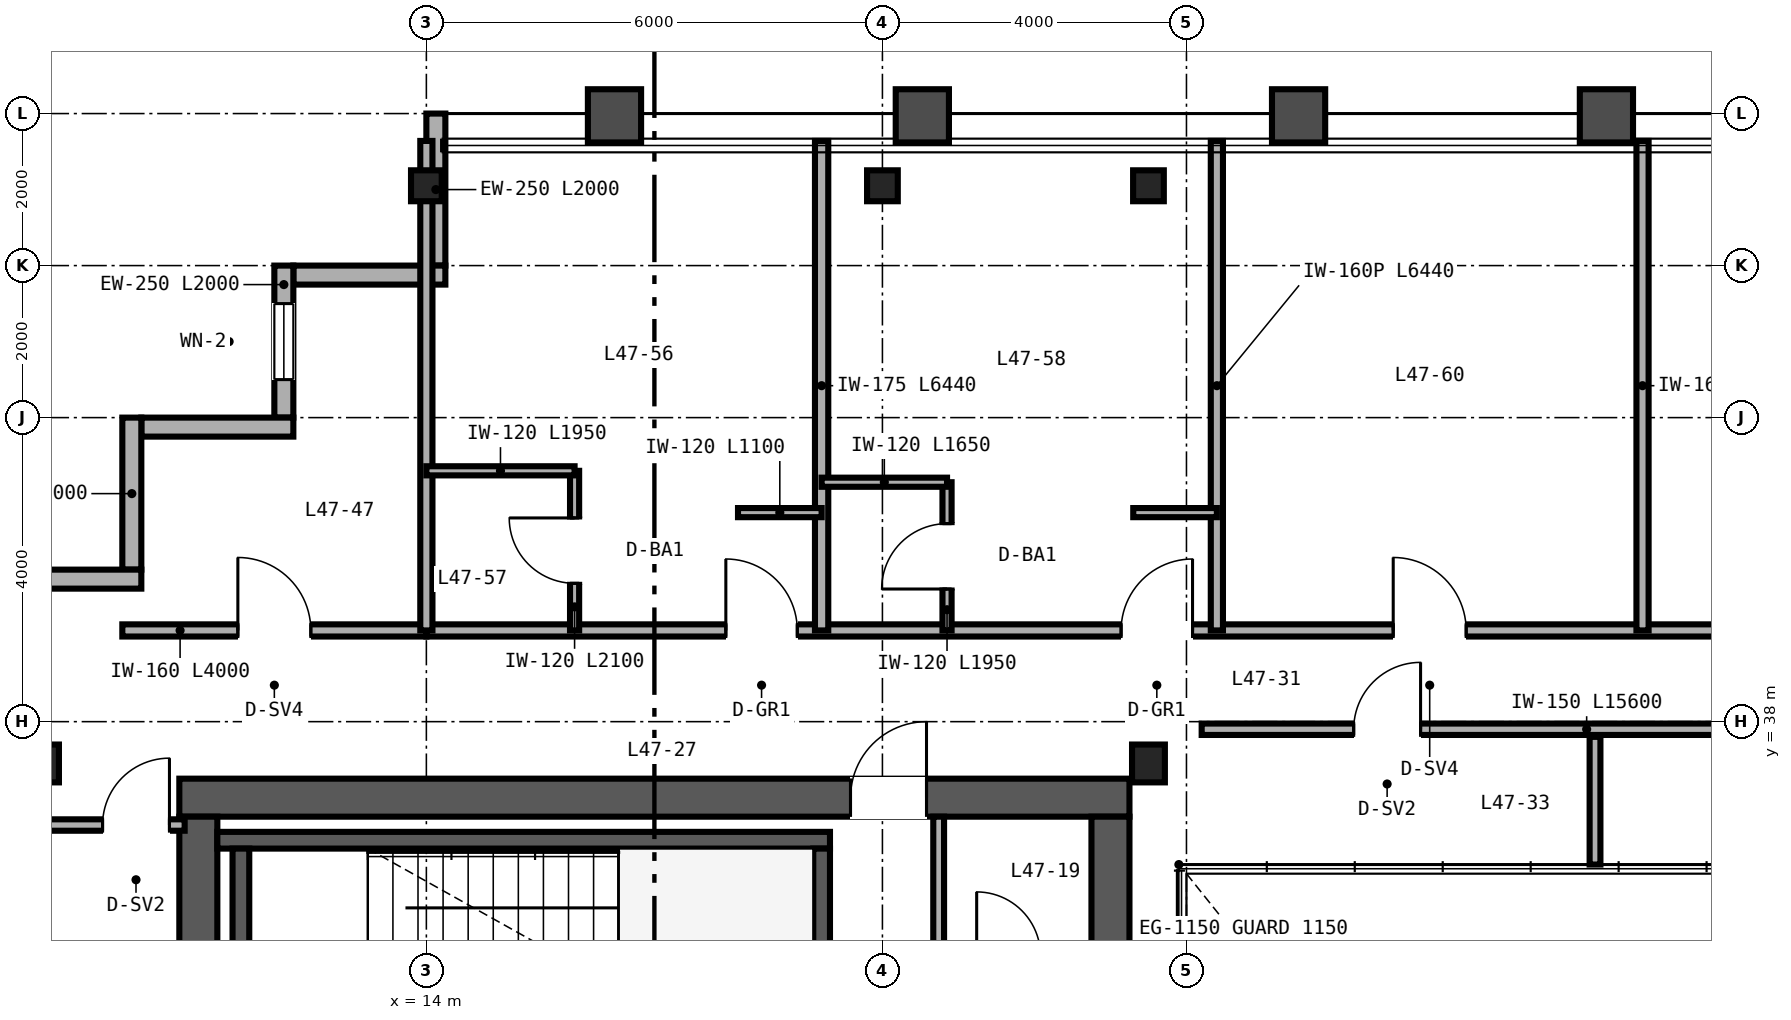
"""IFC4 building model, lengths in metres.
Left out: names, types, materials, properties, quantities, classifications, styles, units other than length and angle.
Written with IfcOpenShell. Run it as: python <this file> out.ifc"""

import sys

from ifc_helpers import new_model, si_unit, direction, frame, frame_2d, origin, origin_2d, place, context, subcontext, project, spatial, rectangle, i_section, extrude, source, transform, mapped, element, fill, save


model = new_model("IFC4")
c1 = context("Model", 3, precision=1e-05, world=origin(), true_north=direction((0.0, 1.0)))
c2 = subcontext(c1, "Body", "Model", "MODEL_VIEW")
j1 = project(units=[si_unit("LENGTHUNIT", "METRE"), si_unit("PLANEANGLEUNIT", "RADIAN")], contexts=[c1])
p1 = place(None, origin())
s1 = spatial("IfcSite", under=j1, at=p1, CompositionType="ELEMENT")
p2 = place(p1, origin())
s2 = spatial("IfcBuilding", under=s1, at=p2, CompositionType="ELEMENT")
p3 = place(p2, frame((0.0, 0.0, 188.4)))
s3 = spatial("IfcBuildingStorey", under=s2, at=p3, CompositionType="ELEMENT", Elevation=188.4)
p4 = place(p3, frame((10.75, 37.0, 0.0), z_axis=(0.0, 0.0, 1.0), x_axis=(1.0, 0.0, 0.0)))
e1 = element("IfcWall", 1, at=p4, inside=s3, PredefinedType="SHEAR", context=c2, shape_type="SweptSolid", body=[
    extrude(rectangle(XDim=12.5, YDim=0.5, at=frame_2d((6.25, 0.0))), origin(), (0.0, 0.0, 1.0), 3.37),
])
p5 = place(p4, frame((8.83, 0.0, 0.0)))
e2 = element("IfcOpeningElement", 2, at=p5, cuts=e1, PredefinedType="OPENING", context=c2, shape_type="SweptSolid", body=[
    extrude(rectangle(XDim=1.0, YDim=2.15, at=frame_2d((0.5, 1.075))), frame((0.0, 0.26, 0.0), z_axis=(0.0, -1.0, 0.0), x_axis=(1.0, 0.0, 0.0)), (0.0, 0.0, 1.0), 0.52),
])
for number, where, z_axis, x_axis in (
    (3, (11.0, 15.25, 0.0), (0.0, 0.0, 1.0), (0.0, 1.0, 0.0)),
    (4, (23.0, 15.25, 0.0), (0.0, 0.0, 1.0), (0.0, 1.0, 0.0)),
):
    element("IfcWall", number, at=place(p3, frame(where, z_axis=z_axis, x_axis=x_axis)), inside=s3, PredefinedType="SHEAR", context=c2, shape_type="SweptSolid", body=[
        extrude(rectangle(XDim=21.5, YDim=0.5, at=frame_2d((10.75, 0.0))), origin(), (0.0, 0.0, 1.0), 3.37),
    ])
p6 = place(p3, frame((11.25, 36.44, 0.0), z_axis=(0.0, 0.0, 1.0), x_axis=(1.0, 0.0, 0.0)))
e5 = element("IfcWall", 5, at=p6, inside=s3, PredefinedType="SHEAR", context=c2, shape_type="SweptSolid", body=[
    extrude(rectangle(XDim=8.06, YDim=0.22, at=frame_2d((4.03, 0.0))), origin(), (0.0, 0.0, 1.0), 3.4),
])
for number, where, z_axis, x_axis in (
    (6, (11.56, 33.05, 0.0), (0.0, 0.0, 1.0), (0.0, 1.0, 0.0)),
    (7, (19.2, 33.05, 0.0), (0.0, 0.0, 1.0), (0.0, 1.0, 0.0)),
):
    element("IfcWall", number, at=place(p3, frame(where, z_axis=z_axis, x_axis=x_axis)), inside=s3, PredefinedType="SHEAR", context=c2, shape_type="SweptSolid", body=[
        extrude(rectangle(XDim=3.28, YDim=0.22, at=frame_2d((1.64, 0.0))), origin(), (0.0, 0.0, 1.0), 3.4),
    ])
m1 = source(origin(), c2, "Body", "SweptSolid", [
    extrude(i_section(OverallWidth=0.432, OverallDepth=0.498, WebThickness=0.056, FlangeThickness=0.089, FilletRadius=0.025, at=origin_2d()), origin(), (0.0, 0.0, 1.0), 3.37),
])
for number, where, z_axis, x_axis in (
    (8, (8.95, 37.45, 0.0), (0.0, 0.0, 1.0), (1.0, 0.0, 0.0)),
    (9, (23.5, 37.45, 0.0), (0.0, 0.0, 1.0), (1.0, 0.0, 0.0)),
):
    element("IfcColumn", number, at=place(p3, frame(where, z_axis=z_axis, x_axis=x_axis)), inside=s3, PredefinedType="COLUMN", context=c2, shape_type="MappedRepresentation", body=[
        mapped(m1, transform((0.0, 0.0, 0.0), scale=1.0)),
    ])
m2 = source(origin(), c2, "Body", "SweptSolid", [
    extrude(i_section(OverallWidth=0.404, OverallDepth=0.407, WebThickness=0.027, FlangeThickness=0.044, FilletRadius=0.025, at=origin_2d()), origin(), (0.0, 0.0, 1.0), 3.37),
])
for number, where, z_axis, x_axis in (
    (10, (14.0, 45.05, 0.0), (0.0, 0.0, 1.0), (1.0, 0.0, 0.0)),
    (11, (20.0, 45.05, 0.0), (0.0, 0.0, 1.0), (1.0, 0.0, 0.0)),
    (12, (23.5, 45.05, 0.0), (0.0, 0.0, 1.0), (1.0, 0.0, 0.0)),
):
    element("IfcColumn", number, at=place(p3, frame(where, z_axis=z_axis, x_axis=x_axis)), inside=s3, PredefinedType="COLUMN", context=c2, shape_type="MappedRepresentation", body=[
        mapped(m2, transform((0.0, 0.0, 0.0), scale=1.0)),
    ])
p7 = place(p3, frame((14.125, 46.0, 0.0), z_axis=(0.0, 0.0, 1.0), x_axis=(0.0, -1.0, 0.0)))
e13 = element("IfcWall", 13, at=p7, inside=s3, PredefinedType="SOLIDWALL", context=c2, shape_type="SweptSolid", body=[
    extrude(rectangle(XDim=2.0, YDim=0.25, at=frame_2d((1.0, 0.0))), origin(), (0.0, 0.0, 1.0), 2.677),
])
p8 = place(p3, frame((14.25, 43.875, 0.0), z_axis=(0.0, 0.0, 1.0), x_axis=(-1.0, 0.0, 0.0)))
e14 = element("IfcWall", 14, at=p8, inside=s3, PredefinedType="SOLIDWALL", context=c2, shape_type="SweptSolid", body=[
    extrude(rectangle(XDim=2.0, YDim=0.25, at=frame_2d((1.0, 0.0))), origin(), (0.0, 0.0, 1.0), 3.37),
])
p9 = place(p3, frame((12.125, 44.0, 0.0), z_axis=(0.0, 0.0, 1.0), x_axis=(0.0, -1.0, 0.0)))
e15 = element("IfcWall", 15, at=p9, inside=s3, PredefinedType="SOLIDWALL", context=c2, shape_type="SweptSolid", body=[
    extrude(rectangle(XDim=2.0, YDim=0.25, at=frame_2d((1.0, 0.0))), origin(), (0.0, 0.0, 1.0), 3.37),
])
p10 = place(p9, frame((0.5, 0.0, 0.85)))
e16 = element("IfcOpeningElement", 16, at=p10, cuts=e15, PredefinedType="OPENING", context=c2, shape_type="SweptSolid", body=[
    extrude(rectangle(XDim=1.0, YDim=1.9, at=frame_2d((0.5, 0.95))), frame((0.0, 0.135, 0.0), z_axis=(0.0, -1.0, 0.0), x_axis=(1.0, 0.0, 0.0)), (0.0, 0.0, 1.0), 0.27),
])
for number, where, z_axis, x_axis in (
    (17, (12.25, 41.875, 0.0), (0.0, 0.0, 1.0), (-1.0, 0.0, 0.0)),
    (18, (10.125, 42.0, 0.0), (0.0, 0.0, 1.0), (0.0, -1.0, 0.0)),
):
    element("IfcWall", number, at=place(p3, frame(where, z_axis=z_axis, x_axis=x_axis)), inside=s3, PredefinedType="SOLIDWALL", context=c2, shape_type="SweptSolid", body=[
        extrude(rectangle(XDim=2.0, YDim=0.25, at=frame_2d((1.0, 0.0))), origin(), (0.0, 0.0, 1.0), 3.37),
    ])
p11 = place(p3, frame((10.25, 39.875, 0.0), z_axis=(0.0, 0.0, 1.0), x_axis=(-1.0, 0.0, 0.0)))
e19 = element("IfcWall", 19, at=p11, inside=s3, PredefinedType="SOLIDWALL", context=c2, shape_type="SweptSolid", body=[
    extrude(rectangle(XDim=2.25, YDim=0.25, at=frame_2d((1.125, 0.0))), origin(), (0.0, 0.0, 1.0), 3.37),
])
p12 = place(p3, frame((20.74, 34.92, 0.0), z_axis=(0.0, 0.0, 1.0), x_axis=(0.0, 1.0, 0.0)))
e20 = element("IfcWall", 20, at=p12, inside=s3, PredefinedType="PARTITIONING", context=c2, shape_type="SweptSolid", body=[
    extrude(rectangle(XDim=1.83, YDim=0.142, at=frame_2d((0.915, 0.0))), origin(), (0.0, 0.0, 1.0), 3.37),
])
p13 = place(p3, frame((24.2, 37.9, 0.0), z_axis=(0.0, 0.0, 1.0), x_axis=(1.0, 0.0, 0.0)))
e21 = element("IfcWall", 21, at=p13, inside=s3, PredefinedType="PARTITIONING", context=c2, shape_type="SweptSolid", body=[
    extrude(rectangle(XDim=15.6, YDim=0.15, at=frame_2d((7.8, 0.0))), origin(), (0.0, 0.0, 1.0), 3.37),
])
p14 = place(p13, frame((2.0, 0.0, 0.0)))
e22 = element("IfcOpeningElement", 22, at=p14, cuts=e21, PredefinedType="OPENING", context=c2, shape_type="SweptSolid", body=[
    extrude(rectangle(XDim=0.88, YDim=2.15, at=frame_2d((0.44, 1.075))), frame((0.0, 0.085, 0.0), z_axis=(0.0, -1.0, 0.0), x_axis=(1.0, 0.0, 0.0)), (0.0, 0.0, 1.0), 0.17),
])
p15 = place(p13, frame((7.25, 0.0, 0.0)))
e23 = element("IfcOpeningElement", 23, at=p15, cuts=e21, PredefinedType="OPENING", context=c2, shape_type="SweptSolid", body=[
    extrude(rectangle(XDim=0.88, YDim=2.15, at=frame_2d((0.44, 1.075))), frame((0.0, 0.085, 0.0), z_axis=(0.0, -1.0, 0.0), x_axis=(1.0, 0.0, 0.0)), (0.0, 0.0, 1.0), 0.17),
])
p16 = place(p13, frame((12.5, 0.0, 0.0)))
e24 = element("IfcOpeningElement", 24, at=p16, cuts=e21, PredefinedType="OPENING", context=c2, shape_type="SweptSolid", body=[
    extrude(rectangle(XDim=0.88, YDim=2.15, at=frame_2d((0.44, 1.075))), frame((0.0, 0.085, 0.0), z_axis=(0.0, -1.0, 0.0), x_axis=(1.0, 0.0, 0.0)), (0.0, 0.0, 1.0), 0.17),
])
p17 = place(p3, frame((29.375, 36.12, 0.0), z_axis=(0.0, 0.0, 1.0), x_axis=(0.0, 1.0, 0.0)))
e25 = element("IfcWall", 25, at=p17, inside=s3, PredefinedType="PARTITIONING", context=c2, shape_type="SweptSolid", body=[
    extrude(rectangle(XDim=1.68, YDim=0.142, at=frame_2d((0.84, 0.0))), origin(), (0.0, 0.0, 1.0), 3.37),
])
p18 = place(p3, frame((8.16, 36.64, 0.0), z_axis=(0.0, 0.0, 1.0), x_axis=(1.0, 0.0, 0.0)))
e26 = element("IfcWall", 26, at=p18, inside=s3, PredefinedType="PARTITIONING", context=c2, shape_type="SweptSolid", body=[
    extrude(rectangle(XDim=2.66, YDim=0.15, at=frame_2d((1.33, 0.0))), origin(), (0.0, 0.0, 1.0), 2.753),
])
p19 = place(p18, frame((1.58, 0.0, 0.0)))
e27 = element("IfcOpeningElement", 27, at=p19, cuts=e26, PredefinedType="OPENING", context=c2, shape_type="SweptSolid", body=[
    extrude(rectangle(XDim=0.88, YDim=2.15, at=frame_2d((0.44, 1.075))), frame((0.0, 0.085, 0.0), z_axis=(0.0, -1.0, 0.0), x_axis=(1.0, 0.0, 0.0)), (0.0, 0.0, 1.0), 0.17),
])
p20 = place(p3, frame((10.0, 39.2, 0.0), z_axis=(0.0, 0.0, 1.0), x_axis=(1.0, 0.0, 0.0)))
e28 = element("IfcWall", 28, at=p20, inside=s3, PredefinedType="PARTITIONING", context=c2, shape_type="SweptSolid", body=[
    extrude(rectangle(XDim=4.0, YDim=0.16, at=frame_2d((2.0, 0.0))), origin(), (0.0, 0.0, 1.0), 3.37),
])
p21 = place(p20, frame((1.52, 0.0, 0.0)))
e29 = element("IfcOpeningElement", 29, at=p21, cuts=e28, PredefinedType="OPENING", context=c2, shape_type="SweptSolid", body=[
    extrude(rectangle(XDim=0.96, YDim=2.15, at=frame_2d((0.48, 1.075))), frame((0.0, 0.09, 0.0), z_axis=(0.0, -1.0, 0.0), x_axis=(1.0, 0.0, 0.0)), (0.0, 0.0, 1.0), 0.18),
])
p22 = place(p3, frame((14.0, 39.2, 0.0), z_axis=(0.0, 0.0, 1.0), x_axis=(1.0, 0.0, 0.0)))
e30 = element("IfcWall", 30, at=p22, inside=s3, PredefinedType="PARTITIONING", context=c2, shape_type="SweptSolid", body=[
    extrude(rectangle(XDim=36.0, YDim=0.16, at=frame_2d((18.0, 0.0))), origin(), (0.0, 0.0, 1.0), 2.913),
])
p23 = place(p22, frame((3.94, 0.0, 0.0)))
e31 = element("IfcOpeningElement", 31, at=p23, cuts=e30, PredefinedType="OPENING", context=c2, shape_type="SweptSolid", body=[
    extrude(rectangle(XDim=0.94, YDim=2.15, at=frame_2d((0.47, 1.075))), frame((0.0, 0.09, 0.0), z_axis=(0.0, -1.0, 0.0), x_axis=(1.0, 0.0, 0.0)), (0.0, 0.0, 1.0), 0.18),
])
p24 = place(p22, frame((9.14, 0.0, 0.0)))
e32 = element("IfcOpeningElement", 32, at=p24, cuts=e30, PredefinedType="OPENING", context=c2, shape_type="SweptSolid", body=[
    extrude(rectangle(XDim=0.94, YDim=2.15, at=frame_2d((0.47, 1.075))), frame((0.0, 0.09, 0.0), z_axis=(0.0, -1.0, 0.0), x_axis=(1.0, 0.0, 0.0)), (0.0, 0.0, 1.0), 0.18),
])
p25 = place(p22, frame((12.72, 0.0, 0.0)))
e33 = element("IfcOpeningElement", 33, at=p25, cuts=e30, PredefinedType="OPENING", context=c2, shape_type="SweptSolid", body=[
    extrude(rectangle(XDim=0.96, YDim=2.15, at=frame_2d((0.48, 1.075))), frame((0.0, 0.09, 0.0), z_axis=(0.0, -1.0, 0.0), x_axis=(1.0, 0.0, 0.0)), (0.0, 0.0, 1.0), 0.18),
])
p26 = place(p22, frame((18.42, 0.0, 0.0)))
e34 = element("IfcOpeningElement", 34, at=p26, cuts=e30, PredefinedType="OPENING", context=c2, shape_type="SweptSolid", body=[
    extrude(rectangle(XDim=0.96, YDim=2.15, at=frame_2d((0.48, 1.075))), frame((0.0, 0.09, 0.0), z_axis=(0.0, -1.0, 0.0), x_axis=(1.0, 0.0, 0.0)), (0.0, 0.0, 1.0), 0.18),
])
p27 = place(p22, frame((26.34, 0.0, 0.0)))
e35 = element("IfcOpeningElement", 35, at=p27, cuts=e30, PredefinedType="OPENING", context=c2, shape_type="SweptSolid", body=[
    extrude(rectangle(XDim=0.94, YDim=2.15, at=frame_2d((0.47, 1.075))), frame((0.0, 0.09, 0.0), z_axis=(0.0, -1.0, 0.0), x_axis=(1.0, 0.0, 0.0)), (0.0, 0.0, 1.0), 0.18),
])
p28 = place(p22, frame((30.54, 0.0, 0.0)))
e36 = element("IfcOpeningElement", 36, at=p28, cuts=e30, PredefinedType="OPENING", context=c2, shape_type="SweptSolid", body=[
    extrude(rectangle(XDim=0.94, YDim=2.15, at=frame_2d((0.47, 1.075))), frame((0.0, 0.09, 0.0), z_axis=(0.0, -1.0, 0.0), x_axis=(1.0, 0.0, 0.0)), (0.0, 0.0, 1.0), 0.18),
])
p29 = place(p22, frame((34.74, 0.0, 0.0)))
e37 = element("IfcOpeningElement", 37, at=p29, cuts=e30, PredefinedType="OPENING", context=c2, shape_type="SweptSolid", body=[
    extrude(rectangle(XDim=0.94, YDim=2.15, at=frame_2d((0.47, 1.075))), frame((0.0, 0.09, 0.0), z_axis=(0.0, -1.0, 0.0), x_axis=(1.0, 0.0, 0.0)), (0.0, 0.0, 1.0), 0.18),
])
p30 = place(p3, frame((14.0, 39.2, 0.0), z_axis=(0.0, 0.0, 1.0), x_axis=(0.0, 1.0, 0.0)))
e38 = element("IfcWall", 38, at=p30, inside=s3, PredefinedType="PARTITIONING", context=c2, shape_type="SweptSolid", body=[
    extrude(rectangle(XDim=6.44, YDim=0.16, at=frame_2d((3.22, 0.0))), origin(), (0.0, 0.0, 1.0), 2.677),
])
p31 = place(p3, frame((19.2, 39.2, 0.0), z_axis=(0.0, 0.0, 1.0), x_axis=(0.0, 1.0, 0.0)))
e39 = element("IfcWall", 39, at=p31, inside=s3, PredefinedType="PARTITIONING", context=c2, shape_type="SweptSolid", body=[
    extrude(rectangle(XDim=6.44, YDim=0.175, at=frame_2d((3.22, 0.0))), origin(), (0.0, 0.0, 1.0), 2.677),
])
p32 = place(p3, frame((15.95, 39.2, 0.0), z_axis=(0.0, 0.0, 1.0), x_axis=(0.0, 1.0, 0.0)))
e40 = element("IfcWall", 40, at=p32, inside=s3, PredefinedType="PARTITIONING", context=c2, shape_type="SweptSolid", body=[
    extrude(rectangle(XDim=2.1, YDim=0.12, at=frame_2d((1.05, 0.0))), origin(), (0.0, 0.0, 1.0), 3.37),
])
p33 = place(p32, frame((0.62, 0.0, 0.0)))
e41 = element("IfcOpeningElement", 41, at=p33, cuts=e40, PredefinedType="OPENING", context=c2, shape_type="SweptSolid", body=[
    extrude(rectangle(XDim=0.86, YDim=2.1, at=frame_2d((0.43, 1.05))), frame((0.0, 0.07, 0.0), z_axis=(0.0, -1.0, 0.0), x_axis=(1.0, 0.0, 0.0)), (0.0, 0.0, 1.0), 0.14),
])
p34 = place(p3, frame((14.0, 41.3, 0.0), z_axis=(0.0, 0.0, 1.0), x_axis=(1.0, 0.0, 0.0)))
e42 = element("IfcWall", 42, at=p34, inside=s3, PredefinedType="PARTITIONING", context=c2, shape_type="SweptSolid", body=[
    extrude(rectangle(XDim=1.95, YDim=0.12, at=frame_2d((0.975, 0.0))), origin(), (0.0, 0.0, 1.0), 3.37),
])
p35 = place(p3, frame((18.1, 40.75, 0.0), z_axis=(0.0, 0.0, 1.0), x_axis=(1.0, 0.0, 0.0)))
e43 = element("IfcWall", 43, at=p35, inside=s3, PredefinedType="PARTITIONING", context=c2, shape_type="SweptSolid", body=[
    extrude(rectangle(XDim=1.1, YDim=0.12, at=frame_2d((0.55, 0.0))), origin(), (0.0, 0.0, 1.0), 3.37),
])
p36 = place(p3, frame((24.4, 39.2, 0.0), z_axis=(0.0, 0.0, 1.0), x_axis=(0.0, 1.0, 0.0)))
e44 = element("IfcWall", 44, at=p36, inside=s3, PredefinedType="PARTITIONING", context=c2, shape_type="SweptSolid", body=[
    extrude(rectangle(XDim=6.44, YDim=0.16, at=frame_2d((3.22, 0.0))), origin(), (0.0, 0.0, 1.0), 2.443),
])
p37 = place(p3, frame((20.85, 39.2, 0.0), z_axis=(0.0, 0.0, 1.0), x_axis=(0.0, 1.0, 0.0)))
e45 = element("IfcWall", 45, at=p37, inside=s3, PredefinedType="PARTITIONING", context=c2, shape_type="SweptSolid", body=[
    extrude(rectangle(XDim=1.95, YDim=0.12, at=frame_2d((0.975, 0.0))), origin(), (0.0, 0.0, 1.0), 3.37),
])
p38 = place(p37, frame((0.545, 0.0, 0.0)))
e46 = element("IfcOpeningElement", 46, at=p38, cuts=e45, PredefinedType="OPENING", context=c2, shape_type="SweptSolid", body=[
    extrude(rectangle(XDim=0.86, YDim=2.1, at=frame_2d((0.43, 1.05))), frame((0.0, 0.07, 0.0), z_axis=(0.0, -1.0, 0.0), x_axis=(1.0, 0.0, 0.0)), (0.0, 0.0, 1.0), 0.14),
])
p39 = place(p3, frame((19.2, 41.15, 0.0), z_axis=(0.0, 0.0, 1.0), x_axis=(1.0, 0.0, 0.0)))
e47 = element("IfcWall", 47, at=p39, inside=s3, PredefinedType="PARTITIONING", context=c2, shape_type="SweptSolid", body=[
    extrude(rectangle(XDim=1.65, YDim=0.12, at=frame_2d((0.825, 0.0))), origin(), (0.0, 0.0, 1.0), 3.37),
])
p40 = place(p3, frame((23.3, 40.75, 0.0), z_axis=(0.0, 0.0, 1.0), x_axis=(1.0, 0.0, 0.0)))
e48 = element("IfcWall", 48, at=p40, inside=s3, PredefinedType="PARTITIONING", context=c2, shape_type="SweptSolid", body=[
    extrude(rectangle(XDim=1.1, YDim=0.12, at=frame_2d((0.55, 0.0))), origin(), (0.0, 0.0, 1.0), 2.913),
])
p41 = place(p3, frame((30.0, 39.2, 0.0), z_axis=(0.0, 0.0, 1.0), x_axis=(0.0, 1.0, 0.0)))
e49 = element("IfcWall", 49, at=p41, inside=s3, PredefinedType="PARTITIONING", context=c2, shape_type="SweptSolid", body=[
    extrude(rectangle(XDim=6.44, YDim=0.16, at=frame_2d((3.22, 0.0))), origin(), (0.0, 0.0, 1.0), 2.443),
])
m3 = source(origin(), c2, "Body", "SweptSolid", [
    extrude(rectangle(XDim=1.0, YDim=1.9, at=frame_2d((0.5, 0.95))), frame((0.0, 0.03, 0.0), z_axis=(0.0, -1.0, 0.0), x_axis=(1.0, 0.0, 0.0)), (0.0, 0.0, 1.0), 0.06),
])
p42 = place(p10, origin())
e50 = element("IfcWindow", 50, at=p42, inside=s3, PartitioningType="SINGLE_PANEL", PredefinedType="WINDOW", context=c2, shape_type="MappedRepresentation", body=[
    mapped(m3, transform((0.0, 0.0, 0.0), scale=1.0)),
])
fill(e16, e50)
m4 = source(origin(), c2, "Body", "SweptSolid", [
    extrude(rectangle(XDim=1.0, YDim=2.15, at=frame_2d((0.5, 1.075))), frame((0.0, 0.025, 0.0), z_axis=(0.0, -1.0, 0.0), x_axis=(1.0, 0.0, 0.0)), (0.0, 0.0, 1.0), 0.05),
])
p43 = place(p5, origin())
e51 = element("IfcDoor", 51, at=p43, inside=s3, OperationType="SINGLE_SWING_RIGHT", PredefinedType="DOOR", context=c2, shape_type="MappedRepresentation", body=[
    mapped(m4, transform((0.0, 0.0, 0.0), scale=1.0)),
])
fill(e2, e51)
m5 = source(origin(), c2, "Body", "SweptSolid", [
    extrude(rectangle(XDim=0.88, YDim=2.15, at=frame_2d((0.44, 1.075))), frame((0.0, 0.025, 0.0), z_axis=(0.0, -1.0, 0.0), x_axis=(1.0, 0.0, 0.0)), (0.0, 0.0, 1.0), 0.05),
])
p44 = place(p14, origin())
e52 = element("IfcDoor", 52, at=p44, inside=s3, OperationType="SINGLE_SWING_RIGHT", PredefinedType="DOOR", context=c2, shape_type="MappedRepresentation", body=[
    mapped(m5, transform((0.0, 0.0, 0.0), scale=1.0)),
])
fill(e22, e52)
p45 = place(p19, origin())
e53 = element("IfcDoor", 53, at=p45, inside=s3, OperationType="SINGLE_SWING_RIGHT", PredefinedType="DOOR", context=c2, shape_type="MappedRepresentation", body=[
    mapped(m5, transform((0.0, 0.0, 0.0), scale=1.0)),
])
fill(e27, e53)
m6 = source(origin(), c2, "Body", "SweptSolid", [
    extrude(rectangle(XDim=0.96, YDim=2.15, at=frame_2d((0.48, 1.075))), frame((0.0, 0.025, 0.0), z_axis=(0.0, -1.0, 0.0), x_axis=(1.0, 0.0, 0.0)), (0.0, 0.0, 1.0), 0.05),
])
p46 = place(p21, origin())
e54 = element("IfcDoor", 54, at=p46, inside=s3, OperationType="SINGLE_SWING_LEFT", PredefinedType="DOOR", context=c2, shape_type="MappedRepresentation", body=[
    mapped(m6, transform((0.0, 0.0, 0.0), scale=1.0)),
])
fill(e29, e54)
m7 = source(origin(), c2, "Body", "SweptSolid", [
    extrude(rectangle(XDim=0.86, YDim=2.1, at=frame_2d((0.43, 1.05))), frame((0.0, 0.025, 0.0), z_axis=(0.0, -1.0, 0.0), x_axis=(1.0, 0.0, 0.0)), (0.0, 0.0, 1.0), 0.05),
])
p47 = place(p33, origin())
e55 = element("IfcDoor", 55, at=p47, inside=s3, OperationType="SINGLE_SWING_RIGHT", PredefinedType="DOOR", context=c2, shape_type="MappedRepresentation", body=[
    mapped(m7, transform((0.0, 0.0, 0.0), scale=1.0)),
])
fill(e41, e55)
p48 = place(p38, origin())
e56 = element("IfcDoor", 56, at=p48, inside=s3, OperationType="SINGLE_SWING_LEFT", PredefinedType="DOOR", context=c2, shape_type="MappedRepresentation", body=[
    mapped(m7, transform((0.0, 0.0, 0.0), scale=1.0)),
])
fill(e46, e56)
m8 = source(origin(), c2, "Body", "SweptSolid", [
    extrude(rectangle(XDim=0.94, YDim=2.15, at=frame_2d((0.47, 1.075))), frame((0.0, 0.025, 0.0), z_axis=(0.0, -1.0, 0.0), x_axis=(1.0, 0.0, 0.0)), (0.0, 0.0, 1.0), 0.05),
])
p49 = place(p23, origin())
e57 = element("IfcDoor", 57, at=p49, inside=s3, OperationType="SINGLE_SWING_LEFT", PredefinedType="DOOR", context=c2, shape_type="MappedRepresentation", body=[
    mapped(m8, transform((0.0, 0.0, 0.0), scale=1.0)),
])
fill(e31, e57)
p50 = place(p24, origin())
e58 = element("IfcDoor", 58, at=p50, inside=s3, OperationType="SINGLE_SWING_RIGHT", PredefinedType="DOOR", context=c2, shape_type="MappedRepresentation", body=[
    mapped(m8, transform((0.0, 0.0, 0.0), scale=1.0)),
])
fill(e32, e58)
p51 = place(p25, origin())
e59 = element("IfcDoor", 59, at=p51, inside=s3, OperationType="SINGLE_SWING_LEFT", PredefinedType="DOOR", context=c2, shape_type="MappedRepresentation", body=[
    mapped(m6, transform((0.0, 0.0, 0.0), scale=1.0)),
])
fill(e33, e59)
save(model, sys.argv[1])
